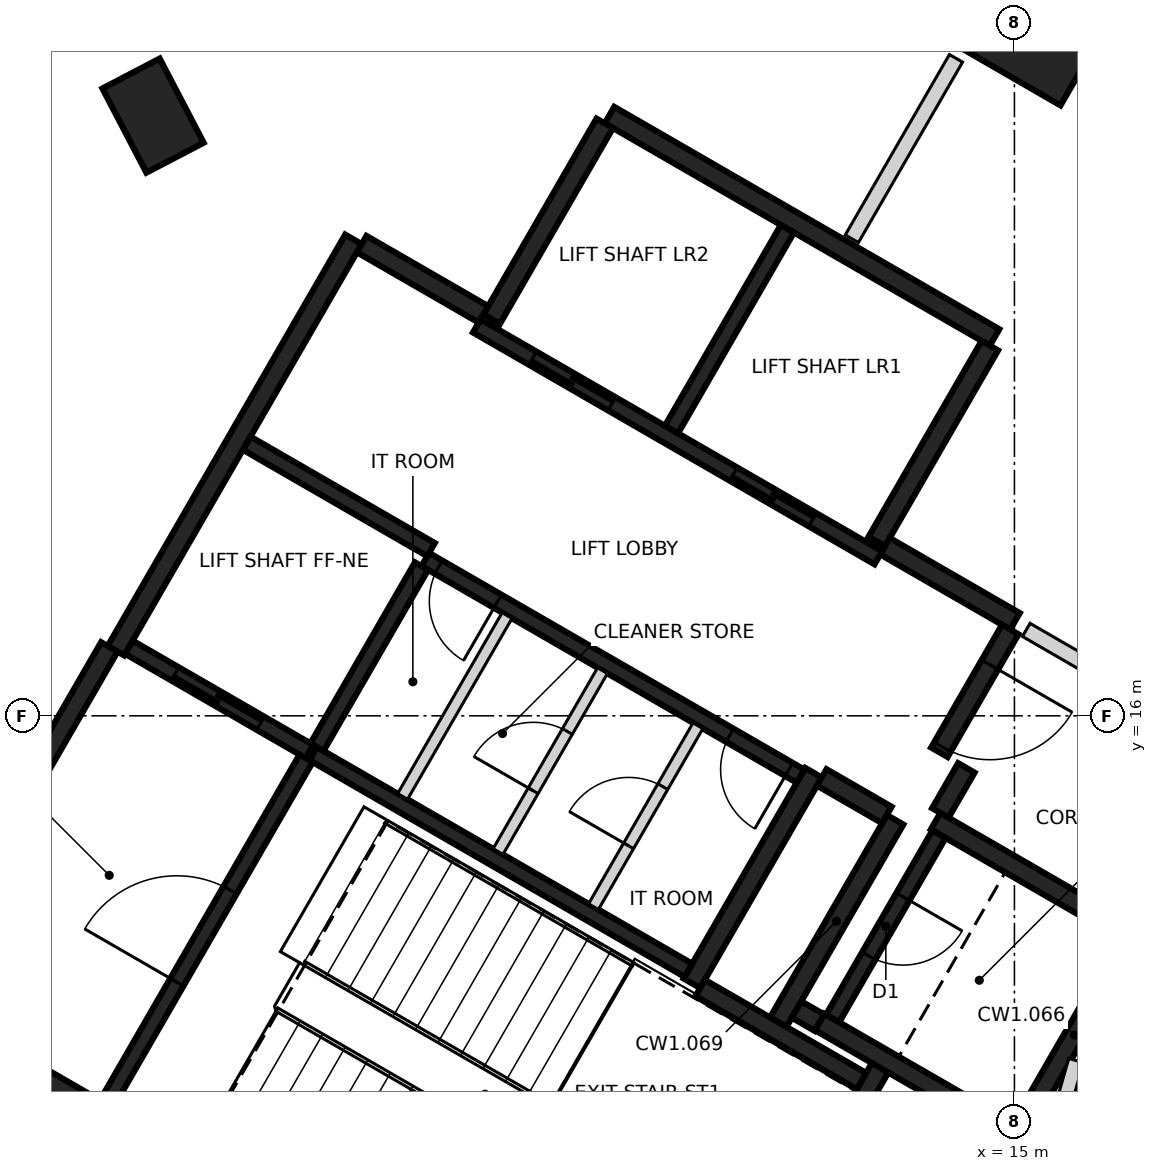
"""IFC4 building model, lengths in metres.
Left out: names, types, materials, properties, quantities, classifications, styles, units other than length and angle.
Written with IfcOpenShell. Run it as: python <this file> out.ifc"""

import sys

from ifc_helpers import new_model, si_unit, direction, frame, frame_2d, origin, origin_2d, place, context, subcontext, project, spatial, rectangle, extrude, element, fill, save


model = new_model("IFC4")
c1 = context("Model", 3, precision=1e-05, world=origin(), true_north=direction((0.0, 1.0)))
c2 = subcontext(c1, "Body", "Model", "MODEL_VIEW")
j1 = project(units=[si_unit("LENGTHUNIT", "METRE"), si_unit("PLANEANGLEUNIT", "RADIAN")], contexts=[c1])
p1 = place(None, origin())
s1 = spatial("IfcSite", under=j1, at=p1, CompositionType="ELEMENT")
p2 = place(p1, origin())
s2 = spatial("IfcBuilding", under=s1, at=p2, CompositionType="ELEMENT")
p3 = place(p2, frame((0.0, 0.0, 150.4)))
s3 = spatial("IfcBuildingStorey", under=s2, at=p3, CompositionType="ELEMENT", Elevation=150.4)
p4 = place(p3, frame((3.667, 23.896, -0.4), z_axis=(0.0, 0.0, 1.0), x_axis=(-0.463006774365, 0.886354740999, 0.0)))
e1 = element("IfcColumn", 1, at=p4, inside=s3, PredefinedType="COLUMN", context=c2, shape_type="SweptSolid", body=[
    extrude(rectangle(XDim=1.25, YDim=0.85, at=origin_2d()), origin(), (0.0, 0.0, 1.0), 3.6),
])
p5 = place(p3, frame((15.207, 26.34, -0.4), z_axis=(0.0, 0.0, 1.0), x_axis=(0.5, 0.866025403784, 0.0)))
e2 = element("IfcColumn", 2, at=p5, inside=s3, PredefinedType="COLUMN", context=c2, shape_type="SweptSolid", body=[
    extrude(rectangle(XDim=3.6, YDim=3.0, at=origin_2d()), origin(), (0.0, 0.0, 1.0), 3.6),
])
p6 = place(p3, frame((10.42, 6.498, 0.0), z_axis=(0.0, 0.0, 1.0), x_axis=(-0.866021906294, 0.500006057782, 0.0)))
e3 = element("IfcWall", 3, at=p6, inside=s3, PredefinedType="SHEAR", context=c2, shape_type="SweptSolid", body=[
    extrude(rectangle(XDim=11.55, YDim=0.25, at=frame_2d((5.775, 0.0))), origin(), (0.0, 0.0, 1.0), 3.2),
])
p7 = place(p6, frame((10.025, 0.0, 0.0)))
e4 = element("IfcOpeningElement", 4, at=p7, cuts=e3, PredefinedType="OPENING", context=c2, shape_type="SweptSolid", body=[
    extrude(rectangle(XDim=1.2, YDim=2.1, at=frame_2d((0.6, 1.05))), frame((0.0, 0.135, 0.0), z_axis=(0.0, -1.0, 0.0), x_axis=(1.0, 0.0, 0.0)), (0.0, 0.0, 1.0), 0.27),
])
p8 = place(p6, frame((8.725, 0.0, 0.0)))
e5 = element("IfcOpeningElement", 5, at=p8, cuts=e3, PredefinedType="OPENING", context=c2, shape_type="SweptSolid", body=[
    extrude(rectangle(XDim=1.2, YDim=2.1, at=frame_2d((0.6, 1.05))), frame((0.0, 0.135, 0.0), z_axis=(0.0, -1.0, 0.0), x_axis=(1.0, 0.0, 0.0)), (0.0, 0.0, 1.0), 0.27),
])
p9 = place(p3, frame((3.179, 16.856, 0.0), z_axis=(0.0, 0.0, 1.0), x_axis=(0.500004234368, 0.866022959057, 0.0)))
e6 = element("IfcWall", 6, at=p9, inside=s3, PredefinedType="SHEAR", context=c2, shape_type="SweptSolid", body=[
    extrude(rectangle(XDim=6.25, YDim=0.25, at=frame_2d((3.125, 0.0))), origin(), (0.0, 0.0, 1.0), 3.2),
])
p10 = place(p3, frame((9.673, 23.903, 0.0), z_axis=(0.0, 0.0, 1.0), x_axis=(0.86603616409, -0.499981362141, 0.0)))
e7 = element("IfcWall", 7, at=p10, inside=s3, PredefinedType="SHEAR", context=c2, shape_type="SweptSolid", body=[
    extrude(rectangle(XDim=5.85, YDim=0.25, at=frame_2d((2.925, 0.0))), origin(), (0.0, 0.0, 1.0), 3.2),
])
p11 = place(p3, frame((0.48, 12.381, 0.0), z_axis=(0.0, 0.0, 1.0), x_axis=(0.49999885962, 0.866026062182, 0.0)))
e8 = element("IfcWall", 8, at=p11, inside=s3, PredefinedType="SHEAR", context=c2, shape_type="SweptSolid", body=[
    extrude(rectangle(XDim=5.225, YDim=0.25, at=frame_2d((2.612, 0.0))), origin(), (0.0, 0.0, 1.0), 3.2),
])
p12 = place(p3, frame((13.238, 11.378, 0.0), z_axis=(0.0, 0.0, 1.0), x_axis=(-0.500008851346, -0.866020293397, 0.0)))
e9 = element("IfcWall", 9, at=p12, inside=s3, PredefinedType="SHEAR", context=c2, shape_type="SweptSolid", body=[
    extrude(rectangle(XDim=5.51, YDim=0.25, at=frame_2d((2.755, 0.0))), origin(), (0.0, 0.0, 1.0), 3.2),
])
p13 = place(p3, frame((12.357, 15.252, 0.0), z_axis=(0.0, 0.0, 1.0), x_axis=(-0.500028443584, -0.866008981251, 0.0)))
e10 = element("IfcWall", 10, at=p13, inside=s3, PredefinedType="SHEAR", context=c2, shape_type="SweptSolid", body=[
    extrude(rectangle(XDim=3.2, YDim=0.25, at=frame_2d((1.6, 0.0))), origin(), (0.0, 0.0, 1.0), 3.2),
])
for number, where, z_axis, x_axis in (
    (11, (8.123, 21.219, 0.0), (0.0, 0.0, 1.0), (0.5, 0.866, 0.0)),
    (12, (14.676, 20.87, 0.0), (0.0, 0.0, 1.0), (-0.5, -0.866, 0.0)),
):
    element("IfcWall", number, at=place(p3, frame(where, z_axis=z_axis, x_axis=x_axis)), inside=s3, PredefinedType="SHEAR", context=c2, shape_type="SweptSolid", body=[
        extrude(rectangle(XDim=2.975, YDim=0.25, at=frame_2d((1.487, 0.0))), origin(), (0.0, 0.0, 1.0), 3.2),
    ])
p14 = place(p3, frame((16.552, 13.119, 0.0), z_axis=(0.0, 0.0, 1.0), x_axis=(-0.499978833458, -0.866037623948, 0.0)))
e13 = element("IfcWall", 13, at=p14, inside=s3, PredefinedType="SHEAR", context=c2, shape_type="SweptSolid", body=[
    extrude(rectangle(XDim=3.05, YDim=0.25, at=frame_2d((1.525, 0.0))), origin(), (0.0, 0.0, 1.0), 3.2),
])
p15 = place(p3, frame((14.918, 10.54, 0.0), z_axis=(0.0, 0.0, 1.0), x_axis=(-0.866063538972, 0.499933942099, 0.0)))
e14 = element("IfcWall", 14, at=p15, inside=s3, PredefinedType="SHEAR", context=c2, shape_type="SweptSolid", body=[
    extrude(rectangle(XDim=2.865, YDim=0.25, at=frame_2d((1.432, 0.0))), origin(), (0.0, 0.0, 1.0), 3.2),
])
p16 = place(p3, frame((13.963, 14.614, 0.0), z_axis=(0.0, 0.0, 1.0), x_axis=(0.866042235819, -0.499970844928, 0.0)))
e15 = element("IfcWall", 15, at=p16, inside=s3, PredefinedType="SHEAR", context=c2, shape_type="SweptSolid", body=[
    extrude(rectangle(XDim=2.865, YDim=0.25, at=frame_2d((1.432, 0.0))), origin(), (0.0, 0.0, 1.0), 3.2),
])
p17 = place(p3, frame((11.888, 11.961, 0.0), z_axis=(0.0, 0.0, 1.0), x_axis=(0.500003324108, 0.866023484601, 0.0)))
e16 = element("IfcWall", 16, at=p17, inside=s3, PredefinedType="SHEAR", context=c2, shape_type="SweptSolid", body=[
    extrude(rectangle(XDim=3.085, YDim=0.25, at=frame_2d((1.542, 0.0))), origin(), (0.0, 0.0, 1.0), 3.2),
])
p18 = place(p3, frame((10.865, 12.418, 0.0), z_axis=(0.0, 0.0, 1.0), x_axis=(0.866026229868, -0.499998569178, 0.0)))
e17 = element("IfcWall", 17, at=p18, inside=s3, PredefinedType="SHEAR", context=c2, shape_type="SweptSolid", body=[
    extrude(rectangle(XDim=2.449, YDim=0.25, at=frame_2d((1.225, 0.0))), origin(), (0.0, 0.0, 1.0), 3.2),
])
p19 = place(p3, frame((13.297, 18.231, 0.0), z_axis=(0.0, 0.0, 1.0), x_axis=(0.866043531843, -0.499968599967, 0.0)))
e18 = element("IfcWall", 18, at=p19, inside=s3, PredefinedType="SHEAR", context=c2, shape_type="SweptSolid", body=[
    extrude(rectangle(XDim=1.975, YDim=0.25, at=frame_2d((0.987, 0.0))), origin(), (0.0, 0.0, 1.0), 3.2),
])
p20 = place(p3, frame((6.413, 22.206, 0.0), z_axis=(0.0, 0.0, 1.0), x_axis=(0.866016279763, -0.500015802937, 0.0)))
e19 = element("IfcWall", 19, at=p20, inside=s3, PredefinedType="SHEAR", context=c2, shape_type="SweptSolid", body=[
    extrude(rectangle(XDim=1.849, YDim=0.25, at=frame_2d((0.925, 0.0))), origin(), (0.0, 0.0, 1.0), 3.2),
])
p21 = place(p3, frame((14.945, 17.135, 0.0), z_axis=(0.0, 0.0, 1.0), x_axis=(-0.499983108224, -0.866035156036, 0.0)))
e20 = element("IfcWall", 20, at=p21, inside=s3, PredefinedType="SHEAR", context=c2, shape_type="SweptSolid", body=[
    extrude(rectangle(XDim=1.865, YDim=0.25, at=frame_2d((0.932, 0.0))), origin(), (0.0, 0.0, 1.0), 3.2),
])
p22 = place(p21, frame((0.535, 0.0, 0.0)))
e21 = element("IfcOpeningElement", 21, at=p22, cuts=e20, PredefinedType="OPENING", context=c2, shape_type="SweptSolid", body=[
    extrude(rectangle(XDim=1.25, YDim=2.1, at=frame_2d((0.625, 1.05))), frame((0.0, 0.135, 0.0), z_axis=(0.0, -1.0, 0.0), x_axis=(1.0, 0.0, 0.0)), (0.0, 0.0, 1.0), 0.27),
])
p23 = place(p3, frame((13.322, 14.695, 0.0), z_axis=(0.0, 0.0, 1.0), x_axis=(-0.866017078145, 0.500014420154, 0.0)))
e22 = element("IfcWall", 22, at=p23, inside=s3, PredefinedType="SHEAR", context=c2, shape_type="SweptSolid", body=[
    extrude(rectangle(XDim=0.989, YDim=0.25, at=frame_2d((0.495, 0.0))), origin(), (0.0, 0.0, 1.0), 3.2),
])
p24 = place(p3, frame((14.368, 15.315, 0.0), z_axis=(0.0, 0.0, 1.0), x_axis=(-0.499897359611, -0.866084655132, 0.0)))
e23 = element("IfcWall", 23, at=p24, inside=s3, PredefinedType="SHEAR", context=c2, shape_type="SweptSolid", body=[
    extrude(rectangle(XDim=0.685, YDim=0.25, at=frame_2d((0.342, 0.0))), origin(), (0.0, 0.0, 1.0), 3.2),
])
p25 = place(p3, frame((12.433, 11.964, 0.0), z_axis=(0.0, 0.0, 1.0), x_axis=(-0.866055875208, 0.499947218231, 0.0)))
e24 = element("IfcWall", 24, at=p25, inside=s3, PredefinedType="SHEAR", context=c2, shape_type="SweptSolid", body=[
    extrude(rectangle(XDim=0.345, YDim=0.25, at=frame_2d((0.172, 0.0))), origin(), (0.0, 0.0, 1.0), 3.2),
])
p26 = place(p3, frame((13.21, 18.08, 0.0), z_axis=(0.0, 0.0, 1.0), x_axis=(-0.866030299012, 0.499991521122, 0.0)))
e25 = element("IfcWall", 25, at=p26, inside=s3, PredefinedType="SHEAR", context=c2, shape_type="SweptSolid", body=[
    extrude(rectangle(XDim=6.1, YDim=0.2, at=frame_2d((3.05, 0.0))), origin(), (0.0, 0.0, 1.0), 3.2),
])
p27 = place(p26, frame((1.0, 0.0, 0.0)))
e26 = element("IfcOpeningElement", 26, at=p27, cuts=e25, PredefinedType="OPENING", context=c2, shape_type="SweptSolid", body=[
    extrude(rectangle(XDim=1.2, YDim=2.1, at=frame_2d((0.6, 1.05))), frame((0.0, 0.11, 0.0), z_axis=(0.0, -1.0, 0.0), x_axis=(1.0, 0.0, 0.0)), (0.0, 0.0, 1.0), 0.22),
])
p28 = place(p26, frame((4.05, 0.0, 0.0)))
e27 = element("IfcOpeningElement", 27, at=p28, cuts=e25, PredefinedType="OPENING", context=c2, shape_type="SweptSolid", body=[
    extrude(rectangle(XDim=1.2, YDim=2.1, at=frame_2d((0.6, 1.05))), frame((0.0, 0.11, 0.0), z_axis=(0.0, -1.0, 0.0), x_axis=(1.0, 0.0, 0.0)), (0.0, 0.0, 1.0), 0.22),
])
p29 = place(p3, frame((5.775, 15.502, 0.0), z_axis=(0.0, 0.0, 1.0), x_axis=(0.866020080793, -0.500009219579, 0.0)))
e28 = element("IfcWall", 28, at=p29, inside=s3, PredefinedType="SHEAR", context=c2, shape_type="SweptSolid", body=[
    extrude(rectangle(XDim=5.699, YDim=0.2, at=frame_2d((2.85, 0.0))), origin(), (0.0, 0.0, 1.0), 3.2),
])
p30 = place(p3, frame((12.185, 15.207, 0.0), z_axis=(0.0, 0.0, 1.0), x_axis=(-0.866020080793, 0.500009219579, 0.0)))
e29 = element("IfcWall", 29, at=p30, inside=s3, PredefinedType="SHEAR", context=c2, shape_type="SweptSolid", body=[
    extrude(rectangle(XDim=5.699, YDim=0.2, at=frame_2d((2.85, 0.0))), origin(), (0.0, 0.0, 1.0), 3.2),
])
p31 = place(p30, frame((0.174, 0.0, 0.0)))
e30 = element("IfcOpeningElement", 30, at=p31, cuts=e29, PredefinedType="OPENING", context=c2, shape_type="SweptSolid", body=[
    extrude(rectangle(XDim=0.9, YDim=2.1, at=frame_2d((0.45, 1.05))), frame((0.0, 0.11, 0.0), z_axis=(0.0, -1.0, 0.0), x_axis=(1.0, 0.0, 0.0)), (0.0, 0.0, 1.0), 0.22),
])
p32 = place(p30, frame((4.599, 0.0, 0.0)))
e31 = element("IfcOpeningElement", 31, at=p32, cuts=e29, PredefinedType="OPENING", context=c2, shape_type="SweptSolid", body=[
    extrude(rectangle(XDim=0.9, YDim=2.1, at=frame_2d((0.45, 1.05))), frame((0.0, 0.11, 0.0), z_axis=(0.0, -1.0, 0.0), x_axis=(1.0, 0.0, 0.0)), (0.0, 0.0, 1.0), 0.22),
])
p33 = place(p3, frame((3.057, 10.895, 0.0), z_axis=(0.0, 0.0, 1.0), x_axis=(0.499989418164, 0.866031513124, 0.0)))
e32 = element("IfcWall", 32, at=p33, inside=s3, PredefinedType="SHEAR", context=c2, shape_type="SweptSolid", body=[
    extrude(rectangle(XDim=5.251, YDim=0.2, at=frame_2d((2.625, 0.0))), origin(), (0.0, 0.0, 1.0), 3.2),
])
p34 = place(p33, frame((1.849, 0.0, 0.0)))
e33 = element("IfcOpeningElement", 33, at=p34, cuts=e32, PredefinedType="OPENING", context=c2, shape_type="SweptSolid", body=[
    extrude(rectangle(XDim=1.4, YDim=2.1, at=frame_2d((0.7, 1.05))), frame((0.0, 0.11, 0.0), z_axis=(0.0, -1.0, 0.0), x_axis=(1.0, 0.0, 0.0)), (0.0, 0.0, 1.0), 0.22),
])
p35 = place(p3, frame((10.489, 19.767, 0.0), z_axis=(0.0, 0.0, 1.0), x_axis=(0.499946628782, 0.866056215479, 0.0)))
e34 = element("IfcWall", 34, at=p35, inside=s3, PredefinedType="SHEAR", context=c2, shape_type="SweptSolid", body=[
    extrude(rectangle(XDim=3.048, YDim=0.2, at=frame_2d((1.524, 0.0))), origin(), (0.0, 0.0, 1.0), 3.2),
])
p36 = place(p3, frame((14.008, 14.442, 0.0), z_axis=(0.0, 0.0, 1.0), x_axis=(-0.499986818241, -0.866033014143, 0.0)))
e35 = element("IfcWall", 35, at=p36, inside=s3, PredefinedType="SHEAR", context=c2, shape_type="SweptSolid", body=[
    extrude(rectangle(XDim=2.798, YDim=0.2, at=frame_2d((1.399, 0.0))), origin(), (0.0, 0.0, 1.0), 3.2),
])
p37 = place(p36, frame((0.949, 0.0, 0.0)))
e36 = element("IfcOpeningElement", 36, at=p37, cuts=e35, PredefinedType="OPENING", context=c2, shape_type="SweptSolid", body=[
    extrude(rectangle(XDim=0.9, YDim=2.1, at=frame_2d((0.45, 1.05))), frame((0.0, 0.11, 0.0), z_axis=(0.0, -1.0, 0.0), x_axis=(1.0, 0.0, 0.0)), (0.0, 0.0, 1.0), 0.22),
])
p38 = place(p3, frame((7.199, 17.97, 0.0), z_axis=(0.0, 0.0, 1.0), x_axis=(-0.499968400327, -0.866043647095, 0.0)))
e37 = element("IfcWall", 37, at=p38, inside=s3, PredefinedType="SHEAR", context=c2, shape_type="SweptSolid", body=[
    extrude(rectangle(XDim=2.75, YDim=0.2, at=frame_2d((1.375, 0.0))), origin(), (0.0, 0.0, 1.0), 3.2),
])
p39 = place(p3, frame((5.725, 15.531, 0.0), z_axis=(0.0, 0.0, 1.0), x_axis=(-0.866037306777, 0.499979382845, 0.0)))
e38 = element("IfcWall", 38, at=p39, inside=s3, PredefinedType="SHEAR", context=c2, shape_type="SweptSolid", body=[
    extrude(rectangle(XDim=2.742, YDim=0.2, at=frame_2d((1.371, 0.0))), origin(), (0.0, 0.0, 1.0), 3.2),
])
p40 = place(p39, frame((0.743, 0.0, 0.0)))
e39 = element("IfcOpeningElement", 39, at=p40, cuts=e38, PredefinedType="OPENING", context=c2, shape_type="SweptSolid", body=[
    extrude(rectangle(XDim=1.3, YDim=2.1, at=frame_2d((0.65, 1.05))), frame((0.0, 0.11, 0.0), z_axis=(0.0, -1.0, 0.0), x_axis=(1.0, 0.0, 0.0)), (0.0, 0.0, 1.0), 0.22),
])
p41 = place(p3, frame((4.901, 19.586, 0.0), z_axis=(0.0, 0.0, 1.0), x_axis=(0.866022890907, -0.500004352405, 0.0)))
e40 = element("IfcWall", 40, at=p41, inside=s3, PredefinedType="SHEAR", context=c2, shape_type="SweptSolid", body=[
    extrude(rectangle(XDim=2.799, YDim=0.2, at=frame_2d((1.399, 0.0))), origin(), (0.0, 0.0, 1.0), 3.2),
])
p42 = place(p3, frame((9.462, 13.489, 0.0), z_axis=(0.0, 0.0, 1.0), x_axis=(0.50002746344, 0.86600954718, 0.0)))
e41 = element("IfcWall", 41, at=p42, inside=s3, PredefinedType="PARTITIONING", context=c2, shape_type="SweptSolid", body=[
    extrude(rectangle(XDim=2.748, YDim=0.15, at=frame_2d((1.374, 0.0))), origin(), (0.0, 0.0, 1.0), 3.2),
])
p43 = place(p42, frame((0.924, 0.0, 0.0)))
e42 = element("IfcOpeningElement", 42, at=p43, cuts=e41, PredefinedType="OPENING", context=c2, shape_type="SweptSolid", body=[
    extrude(rectangle(XDim=0.9, YDim=2.1, at=frame_2d((0.45, 1.05))), frame((0.0, 0.085, 0.0), z_axis=(0.0, -1.0, 0.0), x_axis=(1.0, 0.0, 0.0)), (0.0, 0.0, 1.0), 0.17),
])
p44 = place(p3, frame((8.207, 14.214, 0.0), z_axis=(0.0, 0.0, 1.0), x_axis=(0.499922376475, 0.866070215109, 0.0)))
e43 = element("IfcWall", 43, at=p44, inside=s3, PredefinedType="PARTITIONING", context=c2, shape_type="SweptSolid", body=[
    extrude(rectangle(XDim=2.749, YDim=0.15, at=frame_2d((1.374, 0.0))), origin(), (0.0, 0.0, 1.0), 3.2),
])
p45 = place(p44, frame((0.924, 0.0, 0.0)))
e44 = element("IfcOpeningElement", 44, at=p45, cuts=e43, PredefinedType="OPENING", context=c2, shape_type="SweptSolid", body=[
    extrude(rectangle(XDim=0.9, YDim=2.1, at=frame_2d((0.45, 1.05))), frame((0.0, 0.085, 0.0), z_axis=(0.0, -1.0, 0.0), x_axis=(1.0, 0.0, 0.0)), (0.0, 0.0, 1.0), 0.17),
])
p46 = place(p3, frame((6.951, 14.939, 0.0), z_axis=(0.0, 0.0, 1.0), x_axis=(0.50002746344, 0.86600954718, 0.0)))
e45 = element("IfcWall", 45, at=p46, inside=s3, PredefinedType="PARTITIONING", context=c2, shape_type="SweptSolid", body=[
    extrude(rectangle(XDim=2.748, YDim=0.15, at=frame_2d((1.374, 0.0))), origin(), (0.0, 0.0, 1.0), 3.2),
])
p47 = place(p3, frame((15.156, 17.13, 0.0), z_axis=(0.0, 0.0, 1.0), x_axis=(0.865755062894, -0.500467952093, 0.0)))
e46 = element("IfcWall", 46, at=p47, inside=s3, PredefinedType="PARTITIONING", context=c2, shape_type="SweptSolid", body=[
    extrude(rectangle(XDim=1.389, YDim=0.2, at=frame_2d((0.694, 0.0))), origin(), (0.0, 0.0, 1.0), 3.2),
])
p48 = place(p3, frame((15.52, 10.445, 0.0), z_axis=(0.0, 0.0, 1.0), x_axis=(0.274143458758, 0.961688808306, 0.0)))
e47 = element("IfcWall", 47, at=p48, inside=s3, PredefinedType="PARTITIONING", context=c2, shape_type="SweptSolid", body=[
    extrude(rectangle(XDim=1.061, YDim=0.2, at=frame_2d((0.53, 0.0))), origin(), (0.0, 0.0, 1.0), 3.2),
])
p49 = place(p3, frame((12.861, 22.276, 0.0), z_axis=(0.0, 0.0, 1.0), x_axis=(0.49982784299, 0.866124775868, 0.0)))
e48 = element("IfcWall", 48, at=p49, inside=s3, PredefinedType="PARTITIONING", context=c2, shape_type="SweptSolid", body=[
    extrude(rectangle(XDim=2.741, YDim=0.2, at=frame_2d((1.37, 0.0))), origin(), (0.0, 0.0, 1.0), 3.2),
])
p50 = place(p40, origin())
e49 = element("IfcDoor", 49, at=p50, inside=s3, OperationType="SLIDING_TO_LEFT", PredefinedType="DOOR", context=c2, shape_type="SweptSolid", body=[
    extrude(rectangle(XDim=1.3, YDim=2.1, at=frame_2d((0.65, 1.05))), frame((0.0, 0.025, 0.0), z_axis=(0.0, -1.0, 0.0), x_axis=(1.0, 0.0, 0.0)), (0.0, 0.0, 1.0), 0.05),
])
fill(e39, e49)
p51 = place(p27, origin())
e50 = element("IfcDoor", 50, at=p51, inside=s3, OperationType="DOUBLE_DOOR_SLIDING", PredefinedType="DOOR", context=c2, shape_type="SweptSolid", body=[
    extrude(rectangle(XDim=1.2, YDim=2.1, at=frame_2d((0.6, 1.05))), frame((0.0, 0.025, 0.0), z_axis=(0.0, -1.0, 0.0), x_axis=(1.0, 0.0, 0.0)), (0.0, 0.0, 1.0), 0.05),
])
fill(e26, e50)
p52 = place(p28, origin())
e51 = element("IfcDoor", 51, at=p52, inside=s3, OperationType="DOUBLE_DOOR_SLIDING", PredefinedType="DOOR", context=c2, shape_type="SweptSolid", body=[
    extrude(rectangle(XDim=1.2, YDim=2.1, at=frame_2d((0.6, 1.05))), frame((0.0, 0.025, 0.0), z_axis=(0.0, -1.0, 0.0), x_axis=(1.0, 0.0, 0.0)), (0.0, 0.0, 1.0), 0.05),
])
fill(e27, e51)
p53 = place(p22, origin())
e52 = element("IfcDoor", 52, at=p53, inside=s3, OperationType="SINGLE_SWING_LEFT", PredefinedType="DOOR", context=c2, shape_type="SweptSolid", body=[
    extrude(rectangle(XDim=1.25, YDim=2.1, at=frame_2d((0.625, 1.05))), frame((0.0, 0.025, 0.0), z_axis=(0.0, -1.0, 0.0), x_axis=(1.0, 0.0, 0.0)), (0.0, 0.0, 1.0), 0.05),
])
fill(e21, e52)
p54 = place(p8, origin())
e53 = element("IfcDoor", 53, at=p54, inside=s3, OperationType="SINGLE_SWING_RIGHT", PredefinedType="DOOR", context=c2, shape_type="SweptSolid", body=[
    extrude(rectangle(XDim=1.2, YDim=2.1, at=frame_2d((0.6, 1.05))), frame((0.0, 0.025, 0.0), z_axis=(0.0, -1.0, 0.0), x_axis=(1.0, 0.0, 0.0)), (0.0, 0.0, 1.0), 0.05),
])
fill(e5, e53)
p55 = place(p34, origin())
e54 = element("IfcDoor", 54, at=p55, inside=s3, OperationType="SINGLE_SWING_LEFT", PredefinedType="DOOR", context=c2, shape_type="SweptSolid", body=[
    extrude(rectangle(XDim=1.4, YDim=2.1, at=frame_2d((0.7, 1.05))), frame((0.0, 0.025, 0.0), z_axis=(0.0, -1.0, 0.0), x_axis=(1.0, 0.0, 0.0)), (0.0, 0.0, 1.0), 0.05),
])
fill(e33, e54)
p56 = place(p31, origin())
e55 = element("IfcDoor", 55, at=p56, inside=s3, OperationType="SINGLE_SWING_RIGHT", PredefinedType="DOOR", context=c2, shape_type="SweptSolid", body=[
    extrude(rectangle(XDim=0.9, YDim=2.1, at=frame_2d((0.45, 1.05))), frame((0.0, 0.025, 0.0), z_axis=(0.0, -1.0, 0.0), x_axis=(1.0, 0.0, 0.0)), (0.0, 0.0, 1.0), 0.05),
])
fill(e30, e55)
p57 = place(p43, origin())
e56 = element("IfcDoor", 56, at=p57, inside=s3, OperationType="SINGLE_SWING_LEFT", PredefinedType="DOOR", context=c2, shape_type="SweptSolid", body=[
    extrude(rectangle(XDim=0.9, YDim=2.1, at=frame_2d((0.45, 1.05))), frame((0.0, 0.025, 0.0), z_axis=(0.0, -1.0, 0.0), x_axis=(1.0, 0.0, 0.0)), (0.0, 0.0, 1.0), 0.05),
])
fill(e42, e56)
p58 = place(p45, origin())
e57 = element("IfcDoor", 57, at=p58, inside=s3, OperationType="SINGLE_SWING_RIGHT", PredefinedType="DOOR", context=c2, shape_type="SweptSolid", body=[
    extrude(rectangle(XDim=0.9, YDim=2.1, at=frame_2d((0.45, 1.05))), frame((0.0, 0.025, 0.0), z_axis=(0.0, -1.0, 0.0), x_axis=(1.0, 0.0, 0.0)), (0.0, 0.0, 1.0), 0.05),
])
fill(e44, e57)
p59 = place(p32, origin())
e58 = element("IfcDoor", 58, at=p59, inside=s3, OperationType="SINGLE_SWING_LEFT", PredefinedType="DOOR", context=c2, shape_type="SweptSolid", body=[
    extrude(rectangle(XDim=0.9, YDim=2.1, at=frame_2d((0.45, 1.05))), frame((0.0, 0.025, 0.0), z_axis=(0.0, -1.0, 0.0), x_axis=(1.0, 0.0, 0.0)), (0.0, 0.0, 1.0), 0.05),
])
fill(e31, e58)
p60 = place(p37, origin())
e59 = element("IfcDoor", 59, at=p60, inside=s3, OperationType="SINGLE_SWING_RIGHT", PredefinedType="DOOR", context=c2, shape_type="SweptSolid", body=[
    extrude(rectangle(XDim=0.9, YDim=2.1, at=frame_2d((0.45, 1.05))), frame((0.0, 0.025, 0.0), z_axis=(0.0, -1.0, 0.0), x_axis=(1.0, 0.0, 0.0)), (0.0, 0.0, 1.0), 0.05),
])
fill(e36, e59)
save(model, sys.argv[1])
